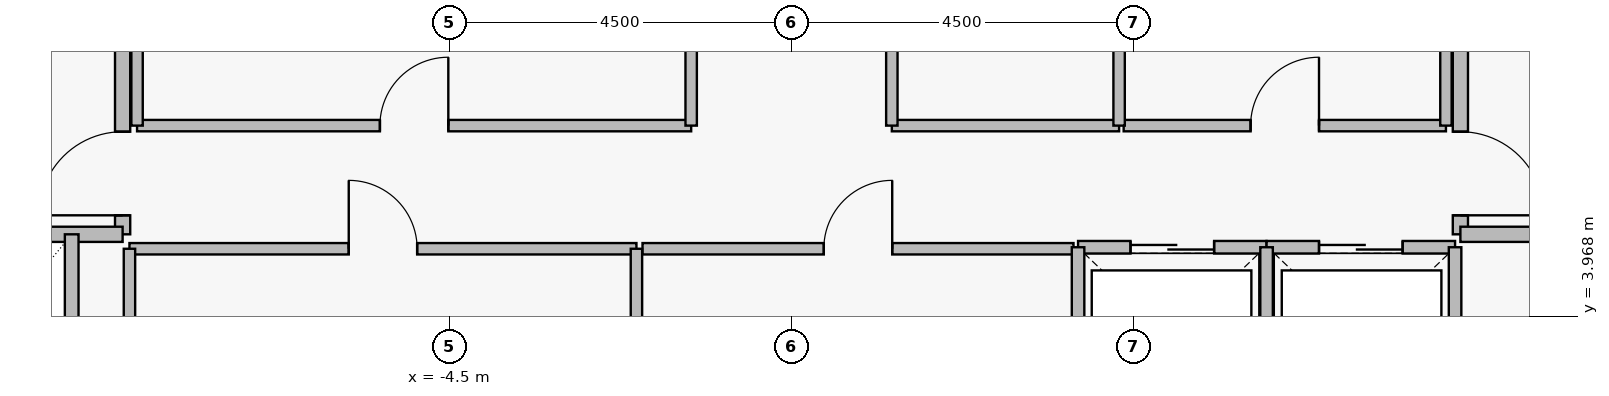
"""IFC4 building model, lengths in metres.
Left out: names, types, materials, properties, quantities, classifications, styles, units other than length and angle.
Written with IfcOpenShell. Run it as: python <this file> out.ifc"""

import sys

from ifc_helpers import new_model, si_unit, direction, frame, frame_2d, origin, place, context, subcontext, project, spatial, rectangle, extrude, element, fill, save


model = new_model("IFC4")
c1 = context("Model", 3, precision=1e-05, world=origin(), true_north=direction((0.0, 1.0)))
c2 = subcontext(c1, "Body", "Model", "MODEL_VIEW")
j1 = project(units=[si_unit("LENGTHUNIT", "METRE"), si_unit("PLANEANGLEUNIT", "RADIAN")], contexts=[c1])
p1 = place(None, origin())
s1 = spatial("IfcSite", under=j1, at=p1, CompositionType="ELEMENT")
p2 = place(p1, origin())
s2 = spatial("IfcBuilding", under=s1, at=p2, CompositionType="ELEMENT")
p3 = place(p2, frame((0.0, 0.0, 292.85)))
s3 = spatial("IfcBuildingStorey", under=s2, at=p3, CompositionType="ELEMENT", Elevation=292.85)
p4 = place(p3, frame((-8.8, 5.05, 0.0), z_axis=(0.0, 0.0, 1.0), x_axis=(0.0, 1.0, 0.0)))
e1 = element("IfcWall", 1, at=p4, inside=s3, PredefinedType="PARTITIONING", context=c2, shape_type="SweptSolid", body=[
    extrude(rectangle(XDim=6.1, YDim=0.2, at=frame_2d((3.05, 0.0))), origin(), (0.0, 0.0, 1.0), 4.16),
])
p5 = place(p4, frame((0.25, 0.0, 0.0)))
e2 = element("IfcOpeningElement", 2, at=p5, cuts=e1, PredefinedType="OPENING", context=c2, shape_type="SweptSolid", body=[
    extrude(rectangle(XDim=1.1, YDim=2.2, at=frame_2d((0.55, 1.1))), frame((0.0, 0.11, 0.0), z_axis=(0.0, -1.0, 0.0), x_axis=(1.0, 0.0, 0.0)), (0.0, 0.0, 1.0), 0.22),
])
p6 = place(p4, frame((3.85, 0.0, 0.0)))
e3 = element("IfcOpeningElement", 3, at=p6, cuts=e1, PredefinedType="OPENING", context=c2, shape_type="SweptSolid", body=[
    extrude(rectangle(XDim=1.1, YDim=2.2, at=frame_2d((0.55, 1.1))), frame((0.0, 0.11, 0.0), z_axis=(0.0, -1.0, 0.0), x_axis=(1.0, 0.0, 0.0)), (0.0, 0.0, 1.0), 0.22),
])
p7 = place(p3, frame((8.8, 11.15, 0.0), z_axis=(0.0, 0.0, 1.0), x_axis=(0.0, -1.0, 0.0)))
e4 = element("IfcWall", 4, at=p7, inside=s3, PredefinedType="PARTITIONING", context=c2, shape_type="SweptSolid", body=[
    extrude(rectangle(XDim=6.1, YDim=0.2, at=frame_2d((3.05, 0.0))), origin(), (0.0, 0.0, 1.0), 4.16),
])
p8 = place(p7, frame((1.15, 0.0, 0.0)))
e5 = element("IfcOpeningElement", 5, at=p8, cuts=e4, PredefinedType="OPENING", context=c2, shape_type="SweptSolid", body=[
    extrude(rectangle(XDim=1.1, YDim=2.2, at=frame_2d((0.55, 1.1))), frame((0.0, 0.11, 0.0), z_axis=(0.0, -1.0, 0.0), x_axis=(1.0, 0.0, 0.0)), (0.0, 0.0, 1.0), 0.22),
])
p9 = place(p7, frame((4.75, 0.0, 0.0)))
e6 = element("IfcOpeningElement", 6, at=p9, cuts=e4, PredefinedType="OPENING", context=c2, shape_type="SweptSolid", body=[
    extrude(rectangle(XDim=1.1, YDim=2.2, at=frame_2d((0.55, 1.1))), frame((0.0, 0.11, 0.0), z_axis=(0.0, -1.0, 0.0), x_axis=(1.0, 0.0, 0.0)), (0.0, 0.0, 1.0), 0.22),
])
p10 = place(p3, frame((3.77, 4.88, 0.0), z_axis=(0.0, 0.0, 1.0), x_axis=(1.0, 0.0, 0.0)))
e7 = element("IfcWall", 7, at=p10, inside=s3, PredefinedType="PARTITIONING", context=c2, shape_type="SweptSolid", body=[
    extrude(rectangle(XDim=2.48, YDim=0.165, at=frame_2d((1.24, 0.0))), origin(), (0.0, 0.0, 1.0), 4.16),
])
p11 = place(p10, frame((0.69, 0.0, 0.0)))
e8 = element("IfcOpeningElement", 8, at=p11, cuts=e7, PredefinedType="OPENING", context=c2, shape_type="SweptSolid", body=[
    extrude(rectangle(XDim=1.1, YDim=2.25, at=frame_2d((0.55, 1.125))), frame((0.0, 0.093, 0.0), z_axis=(0.0, -1.0, 0.0), x_axis=(1.0, 0.0, 0.0)), (0.0, 0.0, 1.0), 0.185),
])
p12 = place(p3, frame((6.25, 4.88, 0.0), z_axis=(0.0, 0.0, 1.0), x_axis=(1.0, 0.0, 0.0)))
e9 = element("IfcWall", 9, at=p12, inside=s3, PredefinedType="PARTITIONING", context=c2, shape_type="SweptSolid", body=[
    extrude(rectangle(XDim=2.48, YDim=0.165, at=frame_2d((1.24, 0.0))), origin(), (0.0, 0.0, 1.0), 4.16),
])
p13 = place(p12, frame((0.69, 0.0, 0.0)))
e10 = element("IfcOpeningElement", 10, at=p13, cuts=e9, PredefinedType="OPENING", context=c2, shape_type="SweptSolid", body=[
    extrude(rectangle(XDim=1.1, YDim=2.25, at=frame_2d((0.55, 1.125))), frame((0.0, 0.093, 0.0), z_axis=(0.0, -1.0, 0.0), x_axis=(1.0, 0.0, 0.0)), (0.0, 0.0, 1.0), 0.185),
])
p14 = place(p3, frame((-8.71, 4.86, 0.0), z_axis=(0.0, 0.0, 1.0), x_axis=(1.0, 0.0, 0.0)))
e11 = element("IfcWall", 11, at=p14, inside=s3, PredefinedType="PARTITIONING", context=c2, shape_type="SweptSolid", body=[
    extrude(rectangle(XDim=6.67, YDim=0.15, at=frame_2d((3.335, 0.0))), origin(), (0.0, 0.0, 1.0), 4.16),
])
p15 = place(p14, frame((2.885, 0.0, 0.0)))
e12 = element("IfcOpeningElement", 12, at=p15, cuts=e11, PredefinedType="OPENING", context=c2, shape_type="SweptSolid", body=[
    extrude(rectangle(XDim=0.9, YDim=2.15, at=frame_2d((0.45, 1.075))), frame((0.0, 0.085, 0.0), z_axis=(0.0, -1.0, 0.0), x_axis=(1.0, 0.0, 0.0)), (0.0, 0.0, 1.0), 0.17),
])
p16 = place(p3, frame((-1.96, 4.86, 0.0), z_axis=(0.0, 0.0, 1.0), x_axis=(1.0, 0.0, 0.0)))
e13 = element("IfcWall", 13, at=p16, inside=s3, PredefinedType="PARTITIONING", context=c2, shape_type="SweptSolid", body=[
    extrude(rectangle(XDim=5.67, YDim=0.15, at=frame_2d((2.835, 0.0))), origin(), (0.0, 0.0, 1.0), 4.16),
])
p17 = place(p16, frame((2.385, 0.0, 0.0)))
e14 = element("IfcOpeningElement", 14, at=p17, cuts=e13, PredefinedType="OPENING", context=c2, shape_type="SweptSolid", body=[
    extrude(rectangle(XDim=0.9, YDim=2.15, at=frame_2d((0.45, 1.075))), frame((0.0, 0.085, 0.0), z_axis=(0.0, -1.0, 0.0), x_axis=(1.0, 0.0, 0.0)), (0.0, 0.0, 1.0), 0.17),
])
p18 = place(p3, frame((-8.61, 6.48, 0.0), z_axis=(0.0, 0.0, 1.0), x_axis=(1.0, 0.0, 0.0)))
e15 = element("IfcWall", 15, at=p18, inside=s3, PredefinedType="PARTITIONING", context=c2, shape_type="SweptSolid", body=[
    extrude(rectangle(XDim=7.29, YDim=0.15, at=frame_2d((3.645, 0.0))), origin(), (0.0, 0.0, 1.0), 4.16),
])
p19 = place(p18, frame((3.195, 0.0, 0.0)))
e16 = element("IfcOpeningElement", 16, at=p19, cuts=e15, PredefinedType="OPENING", context=c2, shape_type="SweptSolid", body=[
    extrude(rectangle(XDim=0.9, YDim=2.15, at=frame_2d((0.45, 1.075))), frame((0.0, 0.085, 0.0), z_axis=(0.0, -1.0, 0.0), x_axis=(1.0, 0.0, 0.0)), (0.0, 0.0, 1.0), 0.17),
])
p20 = place(p3, frame((4.37, 6.48, 0.0), z_axis=(0.0, 0.0, 1.0), x_axis=(1.0, 0.0, 0.0)))
e17 = element("IfcWall", 17, at=p20, inside=s3, PredefinedType="PARTITIONING", context=c2, shape_type="SweptSolid", body=[
    extrude(rectangle(XDim=4.24, YDim=0.15, at=frame_2d((2.12, 0.0))), origin(), (0.0, 0.0, 1.0), 4.16),
])
p21 = place(p20, frame((1.67, 0.0, 0.0)))
e18 = element("IfcOpeningElement", 18, at=p21, cuts=e17, PredefinedType="OPENING", context=c2, shape_type="SweptSolid", body=[
    extrude(rectangle(XDim=0.9, YDim=2.15, at=frame_2d((0.45, 1.075))), frame((0.0, 0.085, 0.0), z_axis=(0.0, -1.0, 0.0), x_axis=(1.0, 0.0, 0.0)), (0.0, 0.0, 1.0), 0.17),
])
for number, where, z_axis, x_axis in (
    (19, (-11.65, 5.05, 0.0), (0.0, 0.0, 1.0), (1.0, 0.0, 0.0)),
    (20, (8.8, 5.05, 0.0), (0.0, 0.0, 1.0), (1.0, 0.0, 0.0)),
):
    element("IfcWall", number, at=place(p3, frame(where, z_axis=z_axis, x_axis=x_axis)), inside=s3, PredefinedType="PARTITIONING", context=c2, shape_type="SweptSolid", body=[
        extrude(rectangle(XDim=2.85, YDim=0.2, at=frame_2d((1.425, 0.0))), origin(), (0.0, 0.0, 1.0), 4.16),
    ])
for number, where, z_axis, x_axis in (
    (21, (3.77, 2.52, 0.0), (0.0, 0.0, 1.0), (0.0, 1.0, 0.0)),
    (22, (6.25, 2.52, 0.0), (0.0, 0.0, 1.0), (0.0, 1.0, 0.0)),
    (23, (8.73, 2.52, 0.0), (0.0, 0.0, 1.0), (0.0, 1.0, 0.0)),
):
    element("IfcWall", number, at=place(p3, frame(where, z_axis=z_axis, x_axis=x_axis)), inside=s3, PredefinedType="PARTITIONING", context=c2, shape_type="SweptSolid", body=[
        extrude(rectangle(XDim=2.36, YDim=0.165, at=frame_2d((1.18, 0.0))), origin(), (0.0, 0.0, 1.0), 4.16),
    ])
for number, where, z_axis, x_axis in (
    (24, (-8.71, 2.49, 0.0), (0.0, 0.0, 1.0), (0.0, 1.0, 0.0)),
    (25, (-2.04, 2.49, 0.0), (0.0, 0.0, 1.0), (0.0, 1.0, 0.0)),
):
    element("IfcWall", number, at=place(p3, frame(where, z_axis=z_axis, x_axis=x_axis)), inside=s3, PredefinedType="PARTITIONING", context=c2, shape_type="SweptSolid", body=[
        extrude(rectangle(XDim=2.37, YDim=0.15, at=frame_2d((1.185, 0.0))), origin(), (0.0, 0.0, 1.0), 4.16),
    ])
p22 = place(p3, frame((-9.47, 2.45, 0.0), z_axis=(0.0, 0.0, 1.0), x_axis=(0.0, 1.0, 0.0)))
e26 = element("IfcWall", 26, at=p22, inside=s3, PredefinedType="PARTITIONING", context=c2, shape_type="SweptSolid", body=[
    extrude(rectangle(XDim=2.6, YDim=0.18, at=frame_2d((1.3, 0.0))), origin(), (0.0, 0.0, 1.0), 4.16),
])
for number, where, z_axis, x_axis in (
    (27, (-8.61, 6.48, 0.0), (0.0, 0.0, 1.0), (0.0, 1.0, 0.0)),
    (28, (-1.32, 6.48, 0.0), (0.0, 0.0, 1.0), (0.0, 1.0, 0.0)),
):
    element("IfcWall", number, at=place(p3, frame(where, z_axis=z_axis, x_axis=x_axis)), inside=s3, PredefinedType="PARTITIONING", context=c2, shape_type="SweptSolid", body=[
        extrude(rectangle(XDim=2.24, YDim=0.15, at=frame_2d((1.12, 0.0))), origin(), (0.0, 0.0, 1.0), 4.16),
    ])
p23 = place(p3, frame((1.32, 6.48, 0.0), z_axis=(0.0, 0.0, 1.0), x_axis=(1.0, 0.0, 0.0)))
e29 = element("IfcWall", 29, at=p23, inside=s3, PredefinedType="PARTITIONING", context=c2, shape_type="SweptSolid", body=[
    extrude(rectangle(XDim=2.99, YDim=0.15, at=frame_2d((1.495, 0.0))), origin(), (0.0, 0.0, 1.0), 4.16),
])
for number, where, z_axis, x_axis in (
    (30, (1.32, 6.48, 0.0), (0.0, 0.0, 1.0), (0.0, 1.0, 0.0)),
    (31, (4.31, 6.48, 0.0), (0.0, 0.0, 1.0), (0.0, 1.0, 0.0)),
    (32, (8.61, 6.48, 0.0), (0.0, 0.0, 1.0), (0.0, 1.0, 0.0)),
):
    element("IfcWall", number, at=place(p3, frame(where, z_axis=z_axis, x_axis=x_axis)), inside=s3, PredefinedType="PARTITIONING", context=c2, shape_type="SweptSolid", body=[
        extrude(rectangle(XDim=2.24, YDim=0.15, at=frame_2d((1.12, 0.0))), origin(), (0.0, 0.0, 1.0), 4.16),
    ])
p24 = place(p5, origin())
e33 = element("IfcDoor", 33, at=p24, inside=s3, OperationType="SINGLE_SWING_LEFT", PredefinedType="DOOR", context=c2, shape_type="SweptSolid", body=[
    extrude(rectangle(XDim=1.1, YDim=2.2, at=frame_2d((0.55, 1.1))), frame((0.0, 0.025, 0.0), z_axis=(0.0, -1.0, 0.0), x_axis=(1.0, 0.0, 0.0)), (0.0, 0.0, 1.0), 0.05),
])
fill(e2, e33)
p25 = place(p9, origin())
e34 = element("IfcDoor", 34, at=p25, inside=s3, OperationType="SINGLE_SWING_RIGHT", PredefinedType="DOOR", context=c2, shape_type="SweptSolid", body=[
    extrude(rectangle(XDim=1.1, YDim=2.2, at=frame_2d((0.55, 1.1))), frame((0.0, 0.025, 0.0), z_axis=(0.0, -1.0, 0.0), x_axis=(1.0, 0.0, 0.0)), (0.0, 0.0, 1.0), 0.05),
])
fill(e6, e34)
p26 = place(p11, origin())
e35 = element("IfcDoor", 35, at=p26, inside=s3, OperationType="SLIDING_TO_LEFT", PredefinedType="DOOR", context=c2, shape_type="SweptSolid", body=[
    extrude(rectangle(XDim=1.1, YDim=2.25, at=frame_2d((0.55, 1.125))), frame((0.0, 0.025, 0.0), z_axis=(0.0, -1.0, 0.0), x_axis=(1.0, 0.0, 0.0)), (0.0, 0.0, 1.0), 0.05),
])
fill(e8, e35)
p27 = place(p13, origin())
e36 = element("IfcDoor", 36, at=p27, inside=s3, OperationType="SLIDING_TO_LEFT", PredefinedType="DOOR", context=c2, shape_type="SweptSolid", body=[
    extrude(rectangle(XDim=1.1, YDim=2.25, at=frame_2d((0.55, 1.125))), frame((0.0, 0.025, 0.0), z_axis=(0.0, -1.0, 0.0), x_axis=(1.0, 0.0, 0.0)), (0.0, 0.0, 1.0), 0.05),
])
fill(e10, e36)
p28 = place(p15, origin())
e37 = element("IfcDoor", 37, at=p28, inside=s3, OperationType="SINGLE_SWING_LEFT", PredefinedType="DOOR", context=c2, shape_type="SweptSolid", body=[
    extrude(rectangle(XDim=0.9, YDim=2.15, at=frame_2d((0.45, 1.075))), frame((0.0, 0.025, 0.0), z_axis=(0.0, -1.0, 0.0), x_axis=(1.0, 0.0, 0.0)), (0.0, 0.0, 1.0), 0.05),
])
fill(e12, e37)
p29 = place(p17, origin())
e38 = element("IfcDoor", 38, at=p29, inside=s3, OperationType="SINGLE_SWING_RIGHT", PredefinedType="DOOR", context=c2, shape_type="SweptSolid", body=[
    extrude(rectangle(XDim=0.9, YDim=2.15, at=frame_2d((0.45, 1.075))), frame((0.0, 0.025, 0.0), z_axis=(0.0, -1.0, 0.0), x_axis=(1.0, 0.0, 0.0)), (0.0, 0.0, 1.0), 0.05),
])
fill(e14, e38)
p30 = place(p19, origin())
e39 = element("IfcDoor", 39, at=p30, inside=s3, OperationType="SINGLE_SWING_RIGHT", PredefinedType="DOOR", context=c2, shape_type="SweptSolid", body=[
    extrude(rectangle(XDim=0.9, YDim=2.15, at=frame_2d((0.45, 1.075))), frame((0.0, 0.025, 0.0), z_axis=(0.0, -1.0, 0.0), x_axis=(1.0, 0.0, 0.0)), (0.0, 0.0, 1.0), 0.05),
])
fill(e16, e39)
p31 = place(p21, origin())
e40 = element("IfcDoor", 40, at=p31, inside=s3, OperationType="SINGLE_SWING_RIGHT", PredefinedType="DOOR", context=c2, shape_type="SweptSolid", body=[
    extrude(rectangle(XDim=0.9, YDim=2.15, at=frame_2d((0.45, 1.075))), frame((0.0, 0.025, 0.0), z_axis=(0.0, -1.0, 0.0), x_axis=(1.0, 0.0, 0.0)), (0.0, 0.0, 1.0), 0.05),
])
fill(e18, e40)
save(model, sys.argv[1])
